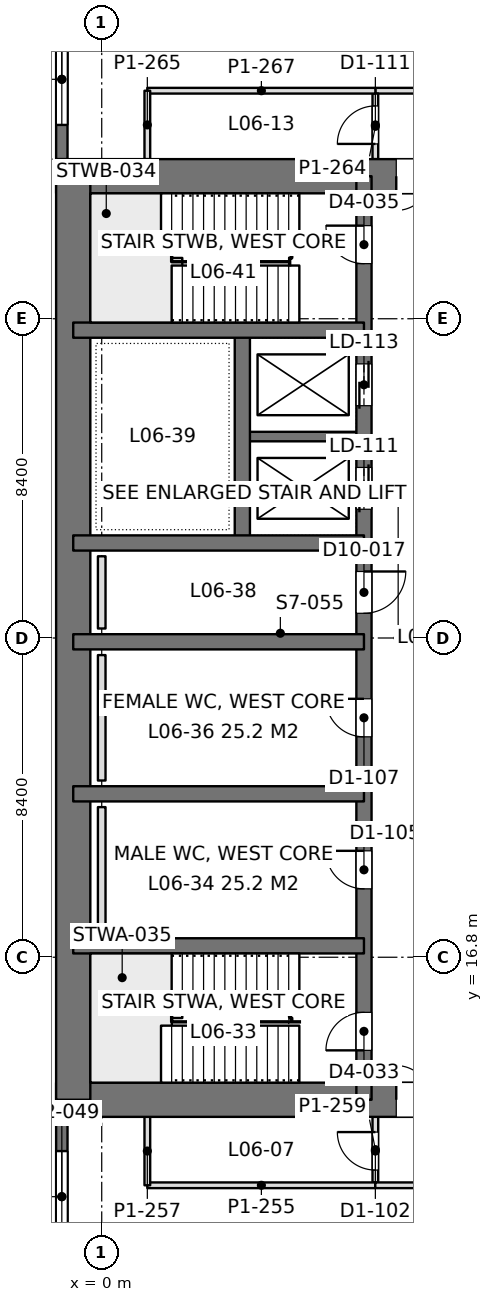
"""IFC4 building model, lengths in metres.
Left out: names, types, materials, properties, quantities, classifications, styles, units other than length and angle.
Written with IfcOpenShell. Run it as: python <this file> out.ifc"""

import sys

from ifc_helpers import new_model, si_unit, direction, frame, frame_2d, origin, place, context, subcontext, project, spatial, rectangle, extrude, element, fill, save


model = new_model("IFC4")
c1 = context("Model", 3, precision=1e-05, world=origin(), true_north=direction((0.0, 1.0)))
c2 = subcontext(c1, "Body", "Model", "MODEL_VIEW")
j1 = project(units=[si_unit("LENGTHUNIT", "METRE"), si_unit("PLANEANGLEUNIT", "RADIAN")], contexts=[c1])
p1 = place(None, origin())
s1 = spatial("IfcSite", under=j1, at=p1, CompositionType="ELEMENT")
p2 = place(p1, origin())
s2 = spatial("IfcBuilding", under=s1, at=p2, CompositionType="ELEMENT")
p3 = place(p2, frame((0.0, 0.0, 27.9)))
s3 = spatial("IfcBuildingStorey", under=s2, at=p3, CompositionType="ELEMENT", Elevation=27.9)
p4 = place(p3, frame((-1.2, 13.05, 0.0), z_axis=(0.0, 0.0, 1.0), x_axis=(1.0, 0.0, 0.0)))
e1 = element("IfcWall", 1, at=p4, inside=s3, PredefinedType="SHEAR", context=c2, shape_type="SweptSolid", body=[
    extrude(rectangle(XDim=18.0, YDim=0.9, at=frame_2d((9.0, 0.0))), origin(), (0.0, 0.0, 1.0), 4.5),
])
p5 = place(p4, frame((8.95, 0.0, 0.0)))
e2 = element("IfcOpeningElement", 2, at=p5, cuts=e1, PredefinedType="OPENING", context=c2, shape_type="SweptSolid", body=[
    extrude(rectangle(XDim=1.8, YDim=2.4, at=frame_2d((0.9, 1.2))), frame((0.0, 0.46, 0.0), z_axis=(0.0, -1.0, 0.0), x_axis=(1.0, 0.0, 0.0)), (0.0, 0.0, 1.0), 0.92),
])
p6 = place(p3, frame((-1.2, 37.35, 0.0), z_axis=(0.0, 0.0, 1.0), x_axis=(1.0, 0.0, 0.0)))
e3 = element("IfcWall", 3, at=p6, inside=s3, PredefinedType="SHEAR", context=c2, shape_type="SweptSolid", body=[
    extrude(rectangle(XDim=18.0, YDim=0.9, at=frame_2d((9.0, 0.0))), origin(), (0.0, 0.0, 1.0), 4.5),
])
p7 = place(p6, frame((8.95, 0.0, 0.0)))
e4 = element("IfcOpeningElement", 4, at=p7, cuts=e3, PredefinedType="OPENING", context=c2, shape_type="SweptSolid", body=[
    extrude(rectangle(XDim=1.8, YDim=2.4, at=frame_2d((0.9, 1.2))), frame((0.0, 0.46, 0.0), z_axis=(0.0, -1.0, 0.0), x_axis=(1.0, 0.0, 0.0)), (0.0, 0.0, 1.0), 0.92),
])
p8 = place(p3, frame((-0.75, 13.05, 0.0), z_axis=(0.0, 0.0, 1.0), x_axis=(0.0, 1.0, 0.0)))
e5 = element("IfcWall", 5, at=p8, inside=s3, PredefinedType="SHEAR", context=c2, shape_type="SweptSolid", body=[
    extrude(rectangle(XDim=24.3, YDim=0.9, at=frame_2d((12.15, 0.0))), origin(), (0.0, 0.0, 1.0), 4.5),
])
p9 = place(p3, frame((6.9, 13.05, 0.0), z_axis=(0.0, 0.0, 1.0), x_axis=(0.0, 1.0, 0.0)))
e6 = element("IfcWall", 6, at=p9, inside=s3, PredefinedType="SHEAR", context=c2, shape_type="SweptSolid", body=[
    extrude(rectangle(XDim=24.3, YDim=0.4, at=frame_2d((12.15, 0.0))), origin(), (0.0, 0.0, 1.0), 4.5),
])
p10 = place(p9, frame((1.3, 0.0, 0.0)))
e7 = element("IfcOpeningElement", 7, at=p10, cuts=e6, PredefinedType="OPENING", context=c2, shape_type="SweptSolid", body=[
    extrude(rectangle(XDim=1.0, YDim=2.2, at=frame_2d((0.5, 1.1))), frame((0.0, 0.21, 0.0), z_axis=(0.0, -1.0, 0.0), x_axis=(1.0, 0.0, 0.0)), (0.0, 0.0, 1.0), 0.42),
])
p11 = place(p9, frame((22.0, 0.0, 0.0)))
e8 = element("IfcOpeningElement", 8, at=p11, cuts=e6, PredefinedType="OPENING", context=c2, shape_type="SweptSolid", body=[
    extrude(rectangle(XDim=1.0, YDim=2.2, at=frame_2d((0.5, 1.1))), frame((0.0, 0.21, 0.0), z_axis=(0.0, -1.0, 0.0), x_axis=(1.0, 0.0, 0.0)), (0.0, 0.0, 1.0), 0.42),
])
p12 = place(p9, frame((5.55, 0.0, 0.0)))
e9 = element("IfcOpeningElement", 9, at=p12, cuts=e6, PredefinedType="OPENING", context=c2, shape_type="SweptSolid", body=[
    extrude(rectangle(XDim=1.0, YDim=2.2, at=frame_2d((0.5, 1.1))), frame((0.0, 0.21, 0.0), z_axis=(0.0, -1.0, 0.0), x_axis=(1.0, 0.0, 0.0)), (0.0, 0.0, 1.0), 0.42),
])
p13 = place(p9, frame((9.55, 0.0, 0.0)))
e10 = element("IfcOpeningElement", 10, at=p13, cuts=e6, PredefinedType="OPENING", context=c2, shape_type="SweptSolid", body=[
    extrude(rectangle(XDim=1.0, YDim=2.2, at=frame_2d((0.5, 1.1))), frame((0.0, 0.21, 0.0), z_axis=(0.0, -1.0, 0.0), x_axis=(1.0, 0.0, 0.0)), (0.0, 0.0, 1.0), 0.42),
])
p14 = place(p9, frame((12.8, 0.0, 0.0)))
e11 = element("IfcOpeningElement", 11, at=p14, cuts=e6, PredefinedType="OPENING", context=c2, shape_type="SweptSolid", body=[
    extrude(rectangle(XDim=1.1, YDim=2.2, at=frame_2d((0.55, 1.1))), frame((0.0, 0.21, 0.0), z_axis=(0.0, -1.0, 0.0), x_axis=(1.0, 0.0, 0.0)), (0.0, 0.0, 1.0), 0.42),
])
p15 = place(p9, frame((15.538, 0.0, 0.0)))
e12 = element("IfcOpeningElement", 12, at=p15, cuts=e6, PredefinedType="OPENING", context=c2, shape_type="SweptSolid", body=[
    extrude(rectangle(XDim=1.1, YDim=2.2, at=frame_2d((0.55, 1.1))), frame((0.0, 0.21, 0.0), z_axis=(0.0, -1.0, 0.0), x_axis=(1.0, 0.0, 0.0)), (0.0, 0.0, 1.0), 0.42),
])
p16 = place(p9, frame((18.262, 0.0, 0.0)))
e13 = element("IfcOpeningElement", 13, at=p16, cuts=e6, PredefinedType="OPENING", context=c2, shape_type="SweptSolid", body=[
    extrude(rectangle(XDim=1.1, YDim=2.2, at=frame_2d((0.55, 1.1))), frame((0.0, 0.21, 0.0), z_axis=(0.0, -1.0, 0.0), x_axis=(1.0, 0.0, 0.0)), (0.0, 0.0, 1.0), 0.42),
])
for number, where, z_axis, x_axis in (
    (14, (-0.75, 17.1, 0.0), (0.0, 0.0, 1.0), (1.0, 0.0, 0.0)),
    (15, (-0.75, 21.1, 0.0), (0.0, 0.0, 1.0), (1.0, 0.0, 0.0)),
    (16, (-0.75, 25.1, 0.0), (0.0, 0.0, 1.0), (1.0, 0.0, 0.0)),
    (17, (-0.75, 27.7, 0.0), (0.0, 0.0, 1.0), (1.0, 0.0, 0.0)),
    (18, (-0.75, 33.3, 0.0), (0.0, 0.0, 1.0), (1.0, 0.0, 0.0)),
):
    element("IfcWall", number, at=place(p3, frame(where, z_axis=z_axis, x_axis=x_axis)), inside=s3, PredefinedType="SHEAR", context=c2, shape_type="SweptSolid", body=[
        extrude(rectangle(XDim=7.65, YDim=0.4, at=frame_2d((3.825, 0.0))), origin(), (0.0, 0.0, 1.0), 4.5),
    ])
p17 = place(p3, frame((3.7, 27.7, 0.0), z_axis=(0.0, 0.0, 1.0), x_axis=(0.0, 1.0, 0.0)))
e19 = element("IfcWall", 19, at=p17, inside=s3, PredefinedType="SHEAR", context=c2, shape_type="SweptSolid", body=[
    extrude(rectangle(XDim=5.6, YDim=0.4, at=frame_2d((2.8, 0.0))), origin(), (0.0, 0.0, 1.0), 4.5),
])
p18 = place(p3, frame((3.7, 30.5, 0.0), z_axis=(0.0, 0.0, 1.0), x_axis=(1.0, 0.0, 0.0)))
e20 = element("IfcWall", 20, at=p18, inside=s3, PredefinedType="SHEAR", context=c2, shape_type="SweptSolid", body=[
    extrude(rectangle(XDim=3.2, YDim=0.25, at=frame_2d((1.6, 0.0))), origin(), (0.0, 0.0, 1.0), 4.5),
])
p19 = place(p3, frame((-1.05, 8.4, 0.0), z_axis=(0.0, 0.0, 1.0), x_axis=(0.0, 1.0, 0.0)))
e21 = element("IfcWall", 21, at=p19, inside=s3, PredefinedType="SOLIDWALL", context=c2, shape_type="SweptSolid", body=[
    extrude(rectangle(XDim=4.2, YDim=0.3, at=frame_2d((2.1, 0.0))), origin(), (0.0, 0.0, 1.0), 4.34),
])
p20 = place(p19, frame((0.9, 0.0, 0.9)))
e22 = element("IfcOpeningElement", 22, at=p20, cuts=e21, PredefinedType="OPENING", context=c2, shape_type="SweptSolid", body=[
    extrude(rectangle(XDim=2.4, YDim=1.9, at=frame_2d((1.2, 0.95))), frame((0.0, 0.16, 0.0), z_axis=(0.0, -1.0, 0.0), x_axis=(1.0, 0.0, 0.0)), (0.0, 0.0, 1.0), 0.32),
])
p21 = place(p3, frame((-1.05, 37.8, 0.0), z_axis=(0.0, 0.0, 1.0), x_axis=(0.0, 1.0, 0.0)))
e23 = element("IfcWall", 23, at=p21, inside=s3, PredefinedType="SOLIDWALL", context=c2, shape_type="SweptSolid", body=[
    extrude(rectangle(XDim=4.2, YDim=0.3, at=frame_2d((2.1, 0.0))), origin(), (0.0, 0.0, 1.0), 4.34),
])
p22 = place(p21, frame((0.9, 0.0, 0.9)))
e24 = element("IfcOpeningElement", 24, at=p22, cuts=e23, PredefinedType="OPENING", context=c2, shape_type="SweptSolid", body=[
    extrude(rectangle(XDim=2.4, YDim=1.9, at=frame_2d((1.2, 0.95))), frame((0.0, 0.16, 0.0), z_axis=(0.0, -1.0, 0.0), x_axis=(1.0, 0.0, 0.0)), (0.0, 0.0, 1.0), 0.32),
])
p23 = place(p3, frame((7.198, 10.8, 0.0), z_axis=(0.0, 0.0, 1.0), x_axis=(1.0, 0.0, 0.0)))
e25 = element("IfcWall", 25, at=p23, inside=s3, PredefinedType="PARTITIONING", context=c2, shape_type="SweptSolid", body=[
    extrude(rectangle(XDim=42.002, YDim=0.15, at=frame_2d((21.001, 0.0))), origin(), (0.0, 0.0, 1.0), 3.74),
])
p24 = place(p23, frame((4.502, 0.0, 0.0)))
e26 = element("IfcOpeningElement", 26, at=p24, cuts=e25, PredefinedType="OPENING", context=c2, shape_type="SweptSolid", body=[
    extrude(rectangle(XDim=1.8, YDim=2.2, at=frame_2d((0.9, 1.1))), frame((0.0, 0.085, 0.0), z_axis=(0.0, -1.0, 0.0), x_axis=(1.0, 0.0, 0.0)), (0.0, 0.0, 1.0), 0.17),
])
p25 = place(p23, frame((12.902, 0.0, 0.0)))
e27 = element("IfcOpeningElement", 27, at=p25, cuts=e25, PredefinedType="OPENING", context=c2, shape_type="SweptSolid", body=[
    extrude(rectangle(XDim=1.8, YDim=2.2, at=frame_2d((0.9, 1.1))), frame((0.0, 0.085, 0.0), z_axis=(0.0, -1.0, 0.0), x_axis=(1.0, 0.0, 0.0)), (0.0, 0.0, 1.0), 0.17),
])
p26 = place(p23, frame((21.302, 0.0, 0.0)))
e28 = element("IfcOpeningElement", 28, at=p26, cuts=e25, PredefinedType="OPENING", context=c2, shape_type="SweptSolid", body=[
    extrude(rectangle(XDim=1.8, YDim=2.2, at=frame_2d((0.9, 1.1))), frame((0.0, 0.085, 0.0), z_axis=(0.0, -1.0, 0.0), x_axis=(1.0, 0.0, 0.0)), (0.0, 0.0, 1.0), 0.17),
])
p27 = place(p23, frame((29.702, 0.0, 0.0)))
e29 = element("IfcOpeningElement", 29, at=p27, cuts=e25, PredefinedType="OPENING", context=c2, shape_type="SweptSolid", body=[
    extrude(rectangle(XDim=1.8, YDim=2.2, at=frame_2d((0.9, 1.1))), frame((0.0, 0.085, 0.0), z_axis=(0.0, -1.0, 0.0), x_axis=(1.0, 0.0, 0.0)), (0.0, 0.0, 1.0), 0.17),
])
p28 = place(p23, frame((38.102, 0.0, 0.0)))
e30 = element("IfcOpeningElement", 30, at=p28, cuts=e25, PredefinedType="OPENING", context=c2, shape_type="SweptSolid", body=[
    extrude(rectangle(XDim=1.8, YDim=2.2, at=frame_2d((0.9, 1.1))), frame((0.0, 0.085, 0.0), z_axis=(0.0, -1.0, 0.0), x_axis=(1.0, 0.0, 0.0)), (0.0, 0.0, 1.0), 0.17),
])
p29 = place(p3, frame((7.2, 10.874, 0.0), z_axis=(0.0, 0.0, 1.0), x_axis=(0.0, 1.0, 0.0)))
e31 = element("IfcWall", 31, at=p29, inside=s3, PredefinedType="PARTITIONING", context=c2, shape_type="SweptSolid", body=[
    extrude(rectangle(XDim=1.728, YDim=0.15, at=frame_2d((0.864, 0.0))), origin(), (0.0, 0.0, 1.0), 4.34),
])
p30 = place(p29, frame((0.326, 0.0, 0.0)))
e32 = element("IfcOpeningElement", 32, at=p30, cuts=e31, PredefinedType="OPENING", context=c2, shape_type="SweptSolid", body=[
    extrude(rectangle(XDim=1.0, YDim=2.2, at=frame_2d((0.5, 1.1))), frame((0.0, 0.085, 0.0), z_axis=(0.0, -1.0, 0.0), x_axis=(1.0, 0.0, 0.0)), (0.0, 0.0, 1.0), 0.17),
])
p31 = place(p3, frame((1.2, 10.8, 0.0), z_axis=(0.0, 0.0, 1.0), x_axis=(1.0, 0.0, 0.0)))
e33 = element("IfcWall", 33, at=p31, inside=s3, PredefinedType="PARTITIONING", context=c2, shape_type="SweptSolid", body=[
    extrude(rectangle(XDim=6.002, YDim=0.15, at=frame_2d((3.001, 0.0))), origin(), (0.0, 0.0, 1.0), 4.34),
])
p32 = place(p3, frame((1.2, 10.8, 0.0), z_axis=(0.0, 0.0, 1.0), x_axis=(0.0, 1.0, 0.0)))
e34 = element("IfcWall", 34, at=p32, inside=s3, PredefinedType="PARTITIONING", context=c2, shape_type="SweptSolid", body=[
    extrude(rectangle(XDim=1.802, YDim=0.15, at=frame_2d((0.901, 0.0))), origin(), (0.0, 0.0, 1.0), 4.34),
])
p33 = place(p3, frame((7.198, 39.6, 0.0), z_axis=(0.0, 0.0, 1.0), x_axis=(1.0, 0.0, 0.0)))
e35 = element("IfcWall", 35, at=p33, inside=s3, PredefinedType="PARTITIONING", context=c2, shape_type="SweptSolid", body=[
    extrude(rectangle(XDim=42.002, YDim=0.15, at=frame_2d((21.001, 0.0))), origin(), (0.0, 0.0, 1.0), 3.74),
])
p34 = place(p33, frame((4.502, 0.0, 0.0)))
e36 = element("IfcOpeningElement", 36, at=p34, cuts=e35, PredefinedType="OPENING", context=c2, shape_type="SweptSolid", body=[
    extrude(rectangle(XDim=1.8, YDim=2.2, at=frame_2d((0.9, 1.1))), frame((0.0, 0.085, 0.0), z_axis=(0.0, -1.0, 0.0), x_axis=(1.0, 0.0, 0.0)), (0.0, 0.0, 1.0), 0.17),
])
p35 = place(p33, frame((12.902, 0.0, 0.0)))
e37 = element("IfcOpeningElement", 37, at=p35, cuts=e35, PredefinedType="OPENING", context=c2, shape_type="SweptSolid", body=[
    extrude(rectangle(XDim=1.8, YDim=2.2, at=frame_2d((0.9, 1.1))), frame((0.0, 0.085, 0.0), z_axis=(0.0, -1.0, 0.0), x_axis=(1.0, 0.0, 0.0)), (0.0, 0.0, 1.0), 0.17),
])
p36 = place(p33, frame((21.302, 0.0, 0.0)))
e38 = element("IfcOpeningElement", 38, at=p36, cuts=e35, PredefinedType="OPENING", context=c2, shape_type="SweptSolid", body=[
    extrude(rectangle(XDim=1.8, YDim=2.2, at=frame_2d((0.9, 1.1))), frame((0.0, 0.085, 0.0), z_axis=(0.0, -1.0, 0.0), x_axis=(1.0, 0.0, 0.0)), (0.0, 0.0, 1.0), 0.17),
])
p37 = place(p33, frame((29.702, 0.0, 0.0)))
e39 = element("IfcOpeningElement", 39, at=p37, cuts=e35, PredefinedType="OPENING", context=c2, shape_type="SweptSolid", body=[
    extrude(rectangle(XDim=1.8, YDim=2.2, at=frame_2d((0.9, 1.1))), frame((0.0, 0.085, 0.0), z_axis=(0.0, -1.0, 0.0), x_axis=(1.0, 0.0, 0.0)), (0.0, 0.0, 1.0), 0.17),
])
p38 = place(p33, frame((38.102, 0.0, 0.0)))
e40 = element("IfcOpeningElement", 40, at=p38, cuts=e35, PredefinedType="OPENING", context=c2, shape_type="SweptSolid", body=[
    extrude(rectangle(XDim=1.8, YDim=2.2, at=frame_2d((0.9, 1.1))), frame((0.0, 0.085, 0.0), z_axis=(0.0, -1.0, 0.0), x_axis=(1.0, 0.0, 0.0)), (0.0, 0.0, 1.0), 0.17),
])
p39 = place(p3, frame((7.2, 37.8, 0.0), z_axis=(0.0, 0.0, 1.0), x_axis=(0.0, 1.0, 0.0)))
e41 = element("IfcWall", 41, at=p39, inside=s3, PredefinedType="PARTITIONING", context=c2, shape_type="SweptSolid", body=[
    extrude(rectangle(XDim=1.726, YDim=0.15, at=frame_2d((0.863, 0.0))), origin(), (0.0, 0.0, 1.0), 4.34),
])
p40 = place(p39, frame((0.4, 0.0, 0.0)))
e42 = element("IfcOpeningElement", 42, at=p40, cuts=e41, PredefinedType="OPENING", context=c2, shape_type="SweptSolid", body=[
    extrude(rectangle(XDim=1.0, YDim=2.2, at=frame_2d((0.5, 1.1))), frame((0.0, 0.085, 0.0), z_axis=(0.0, -1.0, 0.0), x_axis=(1.0, 0.0, 0.0)), (0.0, 0.0, 1.0), 0.17),
])
p41 = place(p3, frame((1.2, 39.6, 0.0), z_axis=(0.0, 0.0, 1.0), x_axis=(1.0, 0.0, 0.0)))
e43 = element("IfcWall", 43, at=p41, inside=s3, PredefinedType="PARTITIONING", context=c2, shape_type="SweptSolid", body=[
    extrude(rectangle(XDim=6.002, YDim=0.15, at=frame_2d((3.001, 0.0))), origin(), (0.0, 0.0, 1.0), 3.98),
])
p42 = place(p3, frame((1.2, 37.8, 0.0), z_axis=(0.0, 0.0, 1.0), x_axis=(0.0, 1.0, 0.0)))
e44 = element("IfcWall", 44, at=p42, inside=s3, PredefinedType="PARTITIONING", context=c2, shape_type="SweptSolid", body=[
    extrude(rectangle(XDim=1.8, YDim=0.15, at=frame_2d((0.9, 0.0))), origin(), (0.0, 0.0, 1.0), 4.34),
])
for number, where, z_axis, x_axis in (
    (45, (0.0, 17.45, 0.0), (0.0, 0.0, 1.0), (0.0, 1.0, 0.0)),
    (46, (0.0, 21.45, 0.0), (0.0, 0.0, 1.0), (0.0, 1.0, 0.0)),
):
    element("IfcWall", number, at=place(p3, frame(where, z_axis=z_axis, x_axis=x_axis)), inside=s3, PredefinedType="PLUMBINGWALL", context=c2, shape_type="SweptSolid", body=[
        extrude(rectangle(XDim=3.3, YDim=0.2, at=frame_2d((1.65, 0.0))), origin(), (0.0, 0.0, 1.0), 1.2),
    ])
p43 = place(p3, frame((0.0, 25.45, 0.0), z_axis=(0.0, 0.0, 1.0), x_axis=(0.0, 1.0, 0.0)))
e47 = element("IfcWall", 47, at=p43, inside=s3, PredefinedType="PLUMBINGWALL", context=c2, shape_type="SweptSolid", body=[
    extrude(rectangle(XDim=1.9, YDim=0.2, at=frame_2d((0.95, 0.0))), origin(), (0.0, 0.0, 1.0), 1.2),
])
p44 = place(p20, origin())
e48 = element("IfcWindow", 48, at=p44, inside=s3, PartitioningType="SINGLE_PANEL", PredefinedType="WINDOW", context=c2, shape_type="SweptSolid", body=[
    extrude(rectangle(XDim=2.4, YDim=1.9, at=frame_2d((1.2, 0.95))), frame((0.0, 0.03, 0.0), z_axis=(0.0, -1.0, 0.0), x_axis=(1.0, 0.0, 0.0)), (0.0, 0.0, 1.0), 0.06),
])
fill(e22, e48)
p45 = place(p22, origin())
e49 = element("IfcWindow", 49, at=p45, inside=s3, PartitioningType="SINGLE_PANEL", PredefinedType="WINDOW", context=c2, shape_type="SweptSolid", body=[
    extrude(rectangle(XDim=2.4, YDim=1.9, at=frame_2d((1.2, 0.95))), frame((0.0, 0.03, 0.0), z_axis=(0.0, -1.0, 0.0), x_axis=(1.0, 0.0, 0.0)), (0.0, 0.0, 1.0), 0.06),
])
fill(e24, e49)
p46 = place(p5, origin())
e50 = element("IfcDoor", 50, at=p46, inside=s3, OperationType="DOUBLE_DOOR_SINGLE_SWING", PredefinedType="DOOR", context=c2, shape_type="SweptSolid", body=[
    extrude(rectangle(XDim=1.8, YDim=2.4, at=frame_2d((0.9, 1.2))), frame((0.0, 0.025, 0.0), z_axis=(0.0, -1.0, 0.0), x_axis=(1.0, 0.0, 0.0)), (0.0, 0.0, 1.0), 0.05),
])
fill(e2, e50)
p47 = place(p7, frame((1.8, 0.0, 0.0), z_axis=(0.0, 0.0, 1.0), x_axis=(-1.0, 0.0, 0.0)))
e51 = element("IfcDoor", 51, at=p47, inside=s3, OperationType="DOUBLE_DOOR_SINGLE_SWING", PredefinedType="DOOR", context=c2, shape_type="SweptSolid", body=[
    extrude(rectangle(XDim=1.8, YDim=2.4, at=frame_2d((0.9, 1.2))), frame((0.0, 0.025, 0.0), z_axis=(0.0, -1.0, 0.0), x_axis=(1.0, 0.0, 0.0)), (0.0, 0.0, 1.0), 0.05),
])
fill(e4, e51)
p48 = place(p10, origin())
e52 = element("IfcDoor", 52, at=p48, inside=s3, OperationType="SINGLE_SWING_LEFT", PredefinedType="DOOR", context=c2, shape_type="SweptSolid", body=[
    extrude(rectangle(XDim=1.0, YDim=2.2, at=frame_2d((0.5, 1.1))), frame((0.0, 0.025, 0.0), z_axis=(0.0, -1.0, 0.0), x_axis=(1.0, 0.0, 0.0)), (0.0, 0.0, 1.0), 0.05),
])
fill(e7, e52)
p49 = place(p11, origin())
e53 = element("IfcDoor", 53, at=p49, inside=s3, OperationType="SINGLE_SWING_RIGHT", PredefinedType="DOOR", context=c2, shape_type="SweptSolid", body=[
    extrude(rectangle(XDim=1.0, YDim=2.2, at=frame_2d((0.5, 1.1))), frame((0.0, 0.025, 0.0), z_axis=(0.0, -1.0, 0.0), x_axis=(1.0, 0.0, 0.0)), (0.0, 0.0, 1.0), 0.05),
])
fill(e8, e53)
p50 = place(p12, origin())
e54 = element("IfcDoor", 54, at=p50, inside=s3, OperationType="SINGLE_SWING_RIGHT", PredefinedType="DOOR", context=c2, shape_type="SweptSolid", body=[
    extrude(rectangle(XDim=1.0, YDim=2.2, at=frame_2d((0.5, 1.1))), frame((0.0, 0.025, 0.0), z_axis=(0.0, -1.0, 0.0), x_axis=(1.0, 0.0, 0.0)), (0.0, 0.0, 1.0), 0.05),
])
fill(e9, e54)
p51 = place(p13, origin())
e55 = element("IfcDoor", 55, at=p51, inside=s3, OperationType="SINGLE_SWING_RIGHT", PredefinedType="DOOR", context=c2, shape_type="SweptSolid", body=[
    extrude(rectangle(XDim=1.0, YDim=2.2, at=frame_2d((0.5, 1.1))), frame((0.0, 0.025, 0.0), z_axis=(0.0, -1.0, 0.0), x_axis=(1.0, 0.0, 0.0)), (0.0, 0.0, 1.0), 0.05),
])
fill(e10, e55)
p52 = place(p14, frame((1.1, 0.0, 0.0), z_axis=(0.0, 0.0, 1.0), x_axis=(-1.0, 0.0, 0.0)))
e56 = element("IfcDoor", 56, at=p52, inside=s3, OperationType="SINGLE_SWING_LEFT", PredefinedType="DOOR", context=c2, shape_type="SweptSolid", body=[
    extrude(rectangle(XDim=1.1, YDim=2.2, at=frame_2d((0.55, 1.1))), frame((0.0, 0.025, 0.0), z_axis=(0.0, -1.0, 0.0), x_axis=(1.0, 0.0, 0.0)), (0.0, 0.0, 1.0), 0.05),
])
fill(e11, e56)
p53 = place(p15, origin())
e57 = element("IfcDoor", 57, at=p53, inside=s3, OperationType="DOUBLE_DOOR_SLIDING", PredefinedType="DOOR", context=c2, shape_type="SweptSolid", body=[
    extrude(rectangle(XDim=1.1, YDim=2.2, at=frame_2d((0.55, 1.1))), frame((0.0, 0.025, 0.0), z_axis=(0.0, -1.0, 0.0), x_axis=(1.0, 0.0, 0.0)), (0.0, 0.0, 1.0), 0.05),
])
fill(e12, e57)
p54 = place(p16, origin())
e58 = element("IfcDoor", 58, at=p54, inside=s3, OperationType="DOUBLE_DOOR_SLIDING", PredefinedType="DOOR", context=c2, shape_type="SweptSolid", body=[
    extrude(rectangle(XDim=1.1, YDim=2.2, at=frame_2d((0.55, 1.1))), frame((0.0, 0.025, 0.0), z_axis=(0.0, -1.0, 0.0), x_axis=(1.0, 0.0, 0.0)), (0.0, 0.0, 1.0), 0.05),
])
fill(e13, e58)
p55 = place(p30, origin())
e59 = element("IfcDoor", 59, at=p55, inside=s3, OperationType="SINGLE_SWING_RIGHT", PredefinedType="DOOR", context=c2, shape_type="SweptSolid", body=[
    extrude(rectangle(XDim=1.0, YDim=2.2, at=frame_2d((0.5, 1.1))), frame((0.0, 0.025, 0.0), z_axis=(0.0, -1.0, 0.0), x_axis=(1.0, 0.0, 0.0)), (0.0, 0.0, 1.0), 0.05),
])
fill(e32, e59)
p56 = place(p40, origin())
e60 = element("IfcDoor", 60, at=p56, inside=s3, OperationType="SINGLE_SWING_LEFT", PredefinedType="DOOR", context=c2, shape_type="SweptSolid", body=[
    extrude(rectangle(XDim=1.0, YDim=2.2, at=frame_2d((0.5, 1.1))), frame((0.0, 0.025, 0.0), z_axis=(0.0, -1.0, 0.0), x_axis=(1.0, 0.0, 0.0)), (0.0, 0.0, 1.0), 0.05),
])
fill(e42, e60)
save(model, sys.argv[1])
